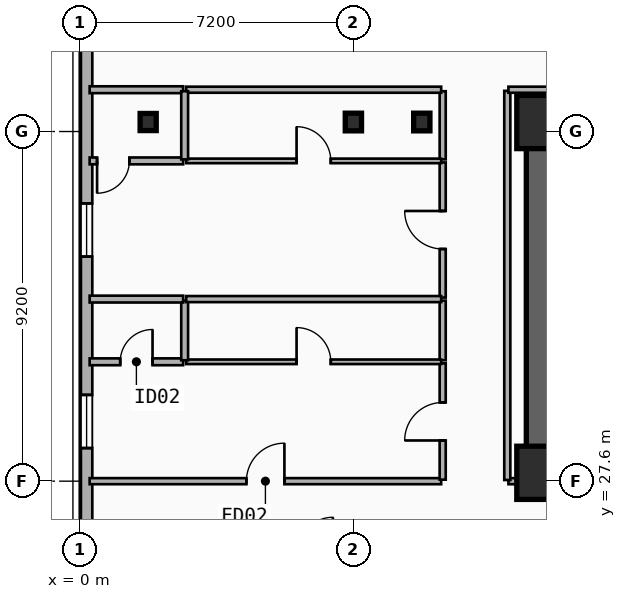
"""IFC4 building model, lengths in metres.
Left out: names, types, materials, properties, quantities, classifications, styles, units other than length and angle.
Written with IfcOpenShell. Run it as: python <this file> out.ifc"""

import sys

from ifc_helpers import new_model, si_unit, direction, frame, frame_2d, origin, origin_2d, place, context, subcontext, project, spatial, rectangle, i_section, extrude, element, fill, save


model = new_model("IFC4")
c1 = context("Model", 3, precision=1e-05, world=origin(), true_north=direction((0.0, 1.0)))
c2 = subcontext(c1, "Body", "Model", "MODEL_VIEW")
j1 = project(units=[si_unit("LENGTHUNIT", "METRE"), si_unit("PLANEANGLEUNIT", "RADIAN")], contexts=[c1])
p1 = place(None, origin())
s1 = spatial("IfcSite", under=j1, at=p1, CompositionType="ELEMENT")
p2 = place(p1, origin())
s2 = spatial("IfcBuilding", under=s1, at=p2, CompositionType="ELEMENT")
p3 = place(p2, frame((0.0, 0.0, 29.0)))
s3 = spatial("IfcBuildingStorey", under=s2, at=p3, CompositionType="ELEMENT", Elevation=29.0)
p4 = place(p3, frame((12.15, 37.05, 0.0), z_axis=(0.0, 0.0, 1.0), x_axis=(1.0, 0.0, 0.0)))
e1 = element("IfcWall", 1, at=p4, inside=s3, PredefinedType="SHEAR", context=c2, shape_type="SweptSolid", body=[
    extrude(rectangle(XDim=33.23, YDim=0.8, at=frame_2d((16.615, 0.0))), origin(), (0.0, 0.0, 1.0), 3.5),
])
p5 = place(p3, frame((21.18, 27.82, 0.0), z_axis=(0.0, 0.0, 1.0), x_axis=(-1.0, 0.0, 0.0)))
e2 = element("IfcWall", 2, at=p5, inside=s3, PredefinedType="SHEAR", context=c2, shape_type="SweptSolid", body=[
    extrude(rectangle(XDim=9.03, YDim=0.8, at=frame_2d((4.515, 0.0))), origin(), (0.0, 0.0, 1.0), 3.5),
])
p6 = place(p5, frame((2.68, 0.0, 0.0)))
e3 = element("IfcOpeningElement", 3, at=p6, cuts=e2, PredefinedType="OPENING", context=c2, shape_type="SweptSolid", body=[
    extrude(rectangle(XDim=1.1, YDim=2.15, at=frame_2d((0.55, 1.075))), frame((0.0, 0.41, 0.0), z_axis=(0.0, -1.0, 0.0), x_axis=(1.0, 0.0, 0.0)), (0.0, 0.0, 1.0), 0.82),
])
p7 = place(p3, frame((12.15, 28.22, 0.0), z_axis=(0.0, 0.0, 1.0), x_axis=(0.0, 1.0, 0.0)))
e4 = element("IfcWall", 4, at=p7, inside=s3, PredefinedType="SHEAR", context=c2, shape_type="SweptSolid", body=[
    extrude(rectangle(XDim=8.43, YDim=0.8, at=frame_2d((4.215, 0.0))), origin(), (0.0, 0.0, 1.0), 3.5),
])
for number, where, z_axis, x_axis in (
    (5, (12.2, 27.82, 0.0), (0.0, 0.0, 1.0), (1.0, 0.0, 0.0)),
    (6, (12.2, 37.05, 0.0), (0.0, 0.0, 1.0), (1.0, 0.0, 0.0)),
):
    element("IfcColumn", number, at=place(p3, frame(where, z_axis=z_axis, x_axis=x_axis)), inside=s3, PredefinedType="COLUMN", context=c2, shape_type="SweptSolid", body=[
        extrude(rectangle(XDim=1.4, YDim=1.4, at=origin_2d()), origin(), (0.0, 0.0, 1.0), 3.5),
    ])
p8 = place(p3, frame((9.0, 37.05, 0.0), z_axis=(0.0, 0.0, 1.0), x_axis=(1.0, 0.0, 0.0)))
e7 = element("IfcColumn", 7, at=p8, inside=s3, PredefinedType="COLUMN", context=c2, shape_type="SweptSolid", body=[
    extrude(i_section(OverallWidth=0.428, OverallDepth=0.465, WebThickness=0.045, FlangeThickness=0.073, FilletRadius=0.015, at=origin_2d()), origin(), (0.0, 0.0, 1.0), 3.5),
])
p9 = place(p3, frame((1.8, 37.05, 0.0), z_axis=(0.0, 0.0, 1.0), x_axis=(1.0, 0.0, 0.0)))
e8 = element("IfcColumn", 8, at=p9, inside=s3, PredefinedType="COLUMN", context=c2, shape_type="SweptSolid", body=[
    extrude(i_section(OverallWidth=0.424, OverallDepth=0.45, WebThickness=0.041, FlangeThickness=0.065, FilletRadius=0.015, at=origin_2d()), origin(), (0.0, 0.0, 1.0), 3.5),
])
p10 = place(p3, frame((7.2, 37.05, 0.0), z_axis=(0.0, 0.0, 1.0), x_axis=(1.0, 0.0, 0.0)))
e9 = element("IfcColumn", 9, at=p10, inside=s3, PredefinedType="COLUMN", context=c2, shape_type="SweptSolid", body=[
    extrude(i_section(OverallWidth=0.428, OverallDepth=0.465, WebThickness=0.045, FlangeThickness=0.073, FilletRadius=0.015, at=origin_2d()), origin(), (0.0, 0.0, 1.0), 3.5),
])
p11 = place(p3, frame((0.18, 25.8, 0.0), z_axis=(0.0, 0.0, 1.0), x_axis=(0.0, 1.0, 0.0)))
e10 = element("IfcWall", 10, at=p11, inside=s3, PredefinedType="SOLIDWALL", context=c2, shape_type="SweptSolid", body=[
    extrude(rectangle(XDim=15.2, YDim=0.3, at=frame_2d((7.6, 0.0))), origin(), (0.0, 0.0, 1.0), 3.24),
])
p12 = place(p11, frame((2.67, 0.0, 0.48)))
e11 = element("IfcOpeningElement", 11, at=p12, cuts=e10, PredefinedType="OPENING", context=c2, shape_type="SweptSolid", body=[
    extrude(rectangle(XDim=1.4, YDim=1.8, at=frame_2d((0.7, 0.9))), frame((0.0, 0.16, 0.0), z_axis=(0.0, -1.0, 0.0), x_axis=(1.0, 0.0, 0.0)), (0.0, 0.0, 1.0), 0.32),
])
p13 = place(p11, frame((7.709, 0.0, 0.48)))
e12 = element("IfcOpeningElement", 12, at=p13, cuts=e10, PredefinedType="OPENING", context=c2, shape_type="SweptSolid", body=[
    extrude(rectangle(XDim=1.4, YDim=1.8, at=frame_2d((0.7, 0.9))), frame((0.0, 0.16, 0.0), z_axis=(0.0, -1.0, 0.0), x_axis=(1.0, 0.0, 0.0)), (0.0, 0.0, 1.0), 0.32),
])
p14 = place(p3, frame((0.26, 27.6, 0.0), z_axis=(0.0, 0.0, 1.0), x_axis=(1.0, 0.0, 0.0)))
e13 = element("IfcWall", 13, at=p14, inside=s3, PredefinedType="PARTITIONING", context=c2, shape_type="SweptSolid", body=[
    extrude(rectangle(XDim=9.25, YDim=0.16, at=frame_2d((4.625, 0.0))), origin(), (0.0, 0.0, 1.0), 2.57),
])
p15 = place(p14, frame((4.125, 0.0, 0.0)))
e14 = element("IfcOpeningElement", 14, at=p15, cuts=e13, PredefinedType="OPENING", context=c2, shape_type="SweptSolid", body=[
    extrude(rectangle(XDim=1.0, YDim=2.15, at=frame_2d((0.5, 1.075))), frame((0.0, 0.09, 0.0), z_axis=(0.0, -1.0, 0.0), x_axis=(1.0, 0.0, 0.0)), (0.0, 0.0, 1.0), 0.18),
])
p16 = place(p3, frame((9.55, 27.64, 0.0), z_axis=(0.0, 0.0, 1.0), x_axis=(0.0, 1.0, 0.0)))
e15 = element("IfcWall", 15, at=p16, inside=s3, PredefinedType="PARTITIONING", context=c2, shape_type="SweptSolid", body=[
    extrude(rectangle(XDim=3.061, YDim=0.16, at=frame_2d((1.531, 0.0))), origin(), (0.0, 0.0, 1.0), 3.24),
])
p17 = place(p16, frame((1.031, 0.0, 0.0)))
e16 = element("IfcOpeningElement", 16, at=p17, cuts=e15, PredefinedType="OPENING", context=c2, shape_type="SweptSolid", body=[
    extrude(rectangle(XDim=1.0, YDim=2.15, at=frame_2d((0.5, 1.075))), frame((0.0, 0.09, 0.0), z_axis=(0.0, -1.0, 0.0), x_axis=(1.0, 0.0, 0.0)), (0.0, 0.0, 1.0), 0.18),
])
p18 = place(p3, frame((9.55, 30.781, 0.0), z_axis=(0.0, 0.0, 1.0), x_axis=(0.0, 1.0, 0.0)))
e17 = element("IfcWall", 17, at=p18, inside=s3, PredefinedType="PARTITIONING", context=c2, shape_type="SweptSolid", body=[
    extrude(rectangle(XDim=1.57, YDim=0.16, at=frame_2d((0.785, 0.0))), origin(), (0.0, 0.0, 1.0), 3.24),
])
p19 = place(p3, frame((9.55, 32.431, 0.0), z_axis=(0.0, 0.0, 1.0), x_axis=(0.0, 1.0, 0.0)))
e18 = element("IfcWall", 18, at=p19, inside=s3, PredefinedType="PARTITIONING", context=c2, shape_type="SweptSolid", body=[
    extrude(rectangle(XDim=3.556, YDim=0.16, at=frame_2d((1.778, 0.0))), origin(), (0.0, 0.0, 1.0), 3.24),
])
p20 = place(p19, frame((1.278, 0.0, 0.0)))
e19 = element("IfcOpeningElement", 19, at=p20, cuts=e18, PredefinedType="OPENING", context=c2, shape_type="SweptSolid", body=[
    extrude(rectangle(XDim=1.0, YDim=2.15, at=frame_2d((0.5, 1.075))), frame((0.0, 0.09, 0.0), z_axis=(0.0, -1.0, 0.0), x_axis=(1.0, 0.0, 0.0)), (0.0, 0.0, 1.0), 0.18),
])
p21 = place(p3, frame((9.55, 36.067, 0.0), z_axis=(0.0, 0.0, 1.0), x_axis=(0.0, 1.0, 0.0)))
e20 = element("IfcWall", 20, at=p21, inside=s3, PredefinedType="PARTITIONING", context=c2, shape_type="SweptSolid", body=[
    extrude(rectangle(XDim=1.793, YDim=0.16, at=frame_2d((0.896, 0.0))), origin(), (0.0, 0.0, 1.0), 2.72),
])
p22 = place(p3, frame((0.26, 37.9, 0.0), z_axis=(0.0, 0.0, 1.0), x_axis=(1.0, 0.0, 0.0)))
e21 = element("IfcWall", 21, at=p22, inside=s3, PredefinedType="PLUMBINGWALL", context=c2, shape_type="SweptSolid", body=[
    extrude(rectangle(XDim=2.46, YDim=0.18, at=frame_2d((1.23, 0.0))), origin(), (0.0, 0.0, 1.0), 3.24),
])
p23 = place(p3, frame((2.8, 37.9, 0.0), z_axis=(0.0, 0.0, 1.0), x_axis=(1.0, 0.0, 0.0)))
e22 = element("IfcWall", 22, at=p23, inside=s3, PredefinedType="PARTITIONING", context=c2, shape_type="SweptSolid", body=[
    extrude(rectangle(XDim=6.71, YDim=0.16, at=frame_2d((3.355, 0.0))), origin(), (0.0, 0.0, 1.0), 3.24),
])
p24 = place(p3, frame((0.26, 30.741, 0.0), z_axis=(0.0, 0.0, 1.0), x_axis=(1.0, 0.0, 0.0)))
e23 = element("IfcWall", 23, at=p24, inside=s3, PredefinedType="PLUMBINGWALL", context=c2, shape_type="SweptSolid", body=[
    extrude(rectangle(XDim=2.46, YDim=0.18, at=frame_2d((1.23, 0.0))), origin(), (0.0, 0.0, 1.0), 2.57),
])
p25 = place(p24, frame((0.805, 0.0, 0.0)))
e24 = element("IfcOpeningElement", 24, at=p25, cuts=e23, PredefinedType="OPENING", context=c2, shape_type="SweptSolid", body=[
    extrude(rectangle(XDim=0.85, YDim=2.1, at=frame_2d((0.425, 1.05))), frame((0.0, 0.1, 0.0), z_axis=(0.0, -1.0, 0.0), x_axis=(1.0, 0.0, 0.0)), (0.0, 0.0, 1.0), 0.2),
])
p26 = place(p3, frame((2.8, 30.741, 0.0), z_axis=(0.0, 0.0, 1.0), x_axis=(1.0, 0.0, 0.0)))
e25 = element("IfcWall", 25, at=p26, inside=s3, PredefinedType="PARTITIONING", context=c2, shape_type="SweptSolid", body=[
    extrude(rectangle(XDim=6.71, YDim=0.12, at=frame_2d((3.355, 0.0))), origin(), (0.0, 0.0, 1.0), 2.57),
])
p27 = place(p26, frame((2.905, 0.0, 0.0)))
e26 = element("IfcOpeningElement", 26, at=p27, cuts=e25, PredefinedType="OPENING", context=c2, shape_type="SweptSolid", body=[
    extrude(rectangle(XDim=0.9, YDim=2.1, at=frame_2d((0.45, 1.05))), frame((0.0, 0.07, 0.0), z_axis=(0.0, -1.0, 0.0), x_axis=(1.0, 0.0, 0.0)), (0.0, 0.0, 1.0), 0.14),
])
p28 = place(p3, frame((2.76, 30.781, 0.0), z_axis=(0.0, 0.0, 1.0), x_axis=(0.0, 1.0, 0.0)))
e27 = element("IfcWall", 27, at=p28, inside=s3, PredefinedType="PLUMBINGWALL", context=c2, shape_type="SweptSolid", body=[
    extrude(rectangle(XDim=1.57, YDim=0.18, at=frame_2d((0.785, 0.0))), origin(), (0.0, 0.0, 1.0), 3.24),
])
p29 = place(p3, frame((0.26, 32.391, 0.0), z_axis=(0.0, 0.0, 1.0), x_axis=(1.0, 0.0, 0.0)))
e28 = element("IfcWall", 28, at=p29, inside=s3, PredefinedType="PLUMBINGWALL", context=c2, shape_type="SweptSolid", body=[
    extrude(rectangle(XDim=2.46, YDim=0.18, at=frame_2d((1.23, 0.0))), origin(), (0.0, 0.0, 1.0), 2.57),
])
p30 = place(p3, frame((2.8, 32.391, 0.0), z_axis=(0.0, 0.0, 1.0), x_axis=(1.0, 0.0, 0.0)))
e29 = element("IfcWall", 29, at=p30, inside=s3, PredefinedType="PARTITIONING", context=c2, shape_type="SweptSolid", body=[
    extrude(rectangle(XDim=6.71, YDim=0.16, at=frame_2d((3.355, 0.0))), origin(), (0.0, 0.0, 1.0), 2.57),
])
p31 = place(p3, frame((2.72, 36.027, 0.0), z_axis=(0.0, 0.0, 1.0), x_axis=(-1.0, 0.0, 0.0)))
e30 = element("IfcWall", 30, at=p31, inside=s3, PredefinedType="PLUMBINGWALL", context=c2, shape_type="SweptSolid", body=[
    extrude(rectangle(XDim=2.46, YDim=0.18, at=frame_2d((1.23, 0.0))), origin(), (0.0, 0.0, 1.0), 2.57),
])
p32 = place(p31, frame((1.415, 0.0, 0.0)))
e31 = element("IfcOpeningElement", 31, at=p32, cuts=e30, PredefinedType="OPENING", context=c2, shape_type="SweptSolid", body=[
    extrude(rectangle(XDim=0.85, YDim=2.1, at=frame_2d((0.425, 1.05))), frame((0.0, 0.1, 0.0), z_axis=(0.0, -1.0, 0.0), x_axis=(1.0, 0.0, 0.0)), (0.0, 0.0, 1.0), 0.2),
])
p33 = place(p3, frame((2.8, 36.027, 0.0), z_axis=(0.0, 0.0, 1.0), x_axis=(1.0, 0.0, 0.0)))
e32 = element("IfcWall", 32, at=p33, inside=s3, PredefinedType="PARTITIONING", context=c2, shape_type="SweptSolid", body=[
    extrude(rectangle(XDim=6.71, YDim=0.12, at=frame_2d((3.355, 0.0))), origin(), (0.0, 0.0, 1.0), 2.57),
])
p34 = place(p33, frame((2.905, 0.0, 0.0)))
e33 = element("IfcOpeningElement", 33, at=p34, cuts=e32, PredefinedType="OPENING", context=c2, shape_type="SweptSolid", body=[
    extrude(rectangle(XDim=0.9, YDim=2.1, at=frame_2d((0.45, 1.05))), frame((0.0, 0.07, 0.0), z_axis=(0.0, -1.0, 0.0), x_axis=(1.0, 0.0, 0.0)), (0.0, 0.0, 1.0), 0.14),
])
p35 = place(p3, frame((2.76, 36.067, 0.0), z_axis=(0.0, 0.0, 1.0), x_axis=(0.0, 1.0, 0.0)))
e34 = element("IfcWall", 34, at=p35, inside=s3, PredefinedType="PLUMBINGWALL", context=c2, shape_type="SweptSolid", body=[
    extrude(rectangle(XDim=1.793, YDim=0.18, at=frame_2d((0.896, 0.0))), origin(), (0.0, 0.0, 1.0), 2.72),
])
p36 = place(p3, frame((11.28, 27.6, 0.0), z_axis=(0.0, 0.0, 1.0), x_axis=(1.0, 0.0, 0.0)))
e35 = element("IfcWall", 35, at=p36, inside=s3, PredefinedType="PARTITIONING", context=c2, shape_type="SweptSolid", body=[
    extrude(rectangle(XDim=0.84, YDim=0.16, at=frame_2d((0.42, 0.0))), origin(), (0.0, 0.0, 1.0), 2.28),
])
p37 = place(p3, frame((11.25, 27.63, 0.0), z_axis=(0.0, 0.0, 1.0), x_axis=(0.0, 1.0, 0.0)))
e36 = element("IfcWall", 36, at=p37, inside=s3, PredefinedType="PARTITIONING", context=c2, shape_type="SweptSolid", body=[
    extrude(rectangle(XDim=10.24, YDim=0.16, at=frame_2d((5.12, 0.0))), origin(), (0.0, 0.0, 1.0), 2.72),
])
p38 = place(p3, frame((11.28, 37.9, 0.0), z_axis=(0.0, 0.0, 1.0), x_axis=(1.0, 0.0, 0.0)))
e37 = element("IfcWall", 37, at=p38, inside=s3, PredefinedType="PARTITIONING", context=c2, shape_type="SweptSolid", body=[
    extrude(rectangle(XDim=35.04, YDim=0.16, at=frame_2d((17.52, 0.0))), origin(), (0.0, 0.0, 1.0), 3.24),
])
p39 = place(p12, origin())
e38 = element("IfcWindow", 38, at=p39, inside=s3, PartitioningType="SINGLE_PANEL", PredefinedType="WINDOW", context=c2, shape_type="SweptSolid", body=[
    extrude(rectangle(XDim=1.4, YDim=1.8, at=frame_2d((0.7, 0.9))), frame((0.0, 0.03, 0.0), z_axis=(0.0, -1.0, 0.0), x_axis=(1.0, 0.0, 0.0)), (0.0, 0.0, 1.0), 0.06),
])
fill(e11, e38)
p40 = place(p13, origin())
e39 = element("IfcWindow", 39, at=p40, inside=s3, PartitioningType="SINGLE_PANEL", PredefinedType="WINDOW", context=c2, shape_type="SweptSolid", body=[
    extrude(rectangle(XDim=1.4, YDim=1.8, at=frame_2d((0.7, 0.9))), frame((0.0, 0.03, 0.0), z_axis=(0.0, -1.0, 0.0), x_axis=(1.0, 0.0, 0.0)), (0.0, 0.0, 1.0), 0.06),
])
fill(e12, e39)
p41 = place(p15, origin())
e40 = element("IfcDoor", 40, at=p41, inside=s3, OperationType="SINGLE_SWING_RIGHT", PredefinedType="DOOR", context=c2, shape_type="SweptSolid", body=[
    extrude(rectangle(XDim=1.0, YDim=2.15, at=frame_2d((0.5, 1.075))), frame((0.0, 0.025, 0.0), z_axis=(0.0, -1.0, 0.0), x_axis=(1.0, 0.0, 0.0)), (0.0, 0.0, 1.0), 0.05),
])
fill(e14, e40)
p42 = place(p17, origin())
e41 = element("IfcDoor", 41, at=p42, inside=s3, OperationType="SINGLE_SWING_LEFT", PredefinedType="DOOR", context=c2, shape_type="SweptSolid", body=[
    extrude(rectangle(XDim=1.0, YDim=2.15, at=frame_2d((0.5, 1.075))), frame((0.0, 0.025, 0.0), z_axis=(0.0, -1.0, 0.0), x_axis=(1.0, 0.0, 0.0)), (0.0, 0.0, 1.0), 0.05),
])
fill(e16, e41)
p43 = place(p20, origin())
e42 = element("IfcDoor", 42, at=p43, inside=s3, OperationType="SINGLE_SWING_RIGHT", PredefinedType="DOOR", context=c2, shape_type="SweptSolid", body=[
    extrude(rectangle(XDim=1.0, YDim=2.15, at=frame_2d((0.5, 1.075))), frame((0.0, 0.025, 0.0), z_axis=(0.0, -1.0, 0.0), x_axis=(1.0, 0.0, 0.0)), (0.0, 0.0, 1.0), 0.05),
])
fill(e19, e42)
p44 = place(p25, origin())
e43 = element("IfcDoor", 43, at=p44, inside=s3, OperationType="SINGLE_SWING_RIGHT", PredefinedType="DOOR", context=c2, shape_type="SweptSolid", body=[
    extrude(rectangle(XDim=0.85, YDim=2.1, at=frame_2d((0.425, 1.05))), frame((0.0, 0.025, 0.0), z_axis=(0.0, -1.0, 0.0), x_axis=(1.0, 0.0, 0.0)), (0.0, 0.0, 1.0), 0.05),
])
fill(e24, e43)
p45 = place(p27, origin())
e44 = element("IfcDoor", 44, at=p45, inside=s3, OperationType="SINGLE_SWING_LEFT", PredefinedType="DOOR", context=c2, shape_type="SweptSolid", body=[
    extrude(rectangle(XDim=0.9, YDim=2.1, at=frame_2d((0.45, 1.05))), frame((0.0, 0.025, 0.0), z_axis=(0.0, -1.0, 0.0), x_axis=(1.0, 0.0, 0.0)), (0.0, 0.0, 1.0), 0.05),
])
fill(e26, e44)
p46 = place(p32, origin())
e45 = element("IfcDoor", 45, at=p46, inside=s3, OperationType="SINGLE_SWING_RIGHT", PredefinedType="DOOR", context=c2, shape_type="SweptSolid", body=[
    extrude(rectangle(XDim=0.85, YDim=2.1, at=frame_2d((0.425, 1.05))), frame((0.0, 0.025, 0.0), z_axis=(0.0, -1.0, 0.0), x_axis=(1.0, 0.0, 0.0)), (0.0, 0.0, 1.0), 0.05),
])
fill(e31, e45)
p47 = place(p34, origin())
e46 = element("IfcDoor", 46, at=p47, inside=s3, OperationType="SINGLE_SWING_LEFT", PredefinedType="DOOR", context=c2, shape_type="SweptSolid", body=[
    extrude(rectangle(XDim=0.9, YDim=2.1, at=frame_2d((0.45, 1.05))), frame((0.0, 0.025, 0.0), z_axis=(0.0, -1.0, 0.0), x_axis=(1.0, 0.0, 0.0)), (0.0, 0.0, 1.0), 0.05),
])
fill(e33, e46)
save(model, sys.argv[1])
